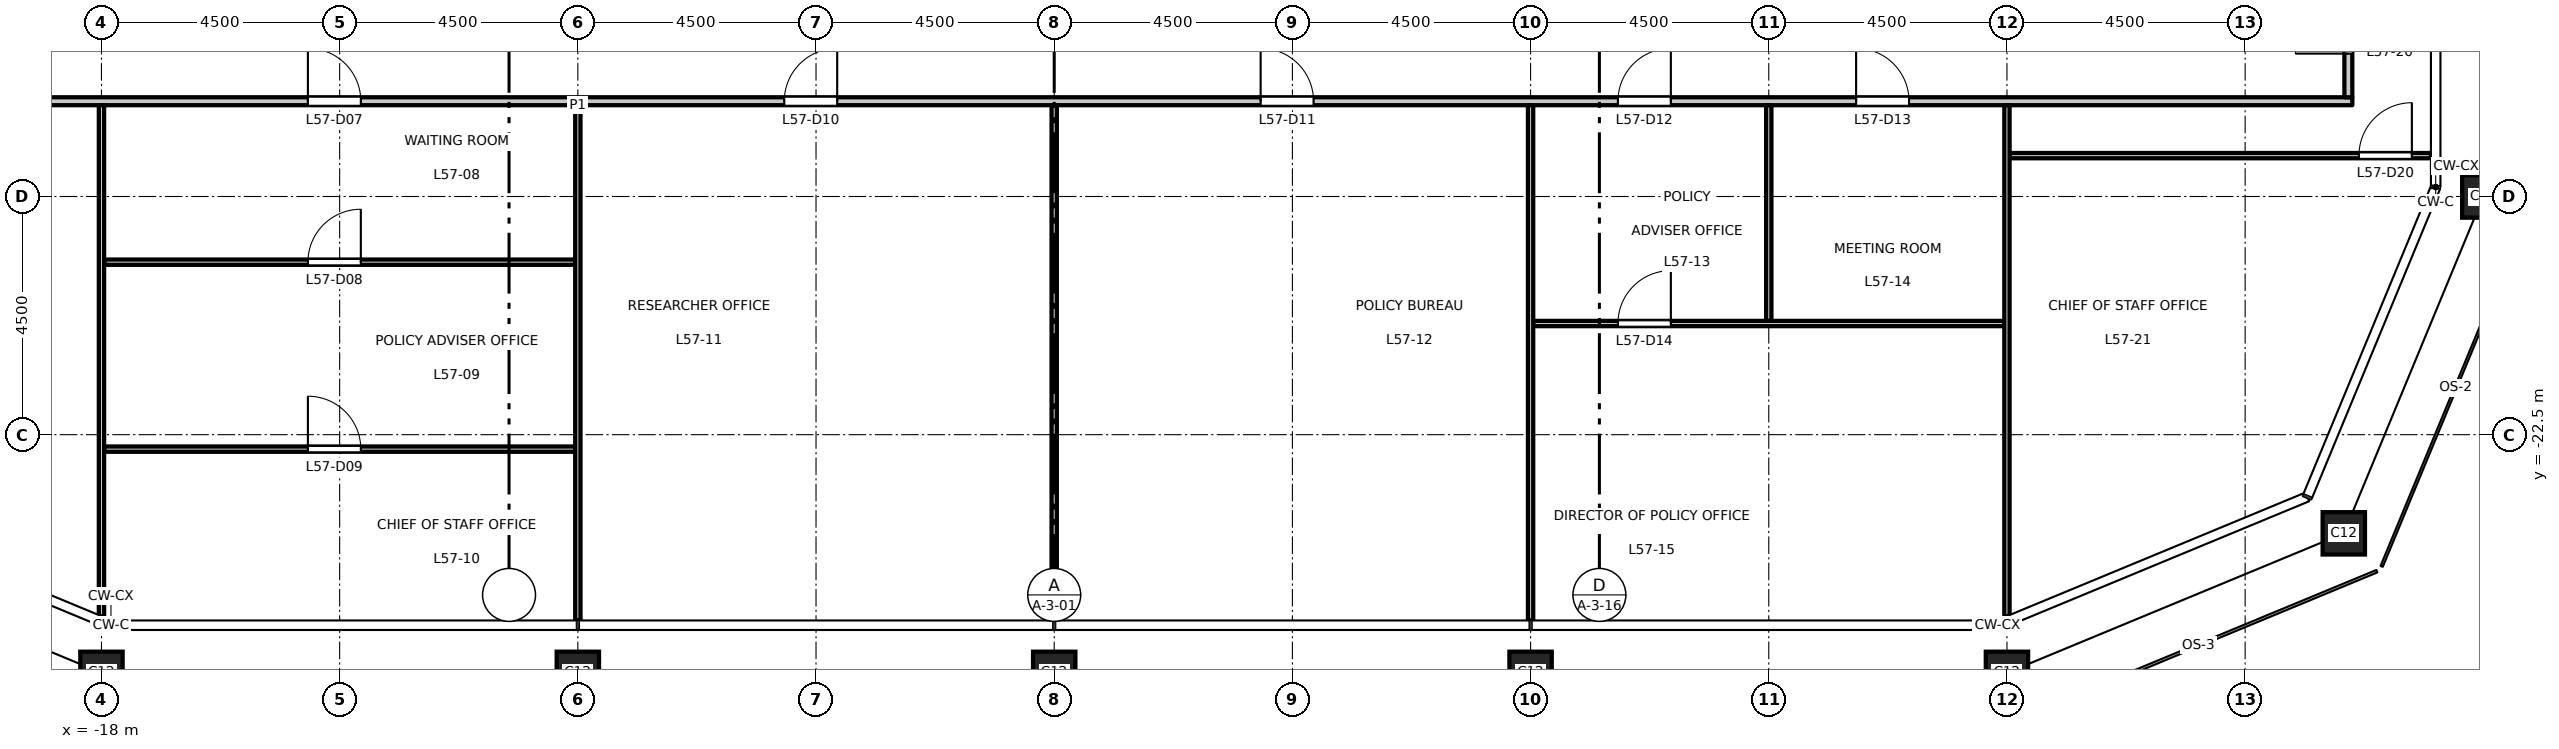
"""IFC4 building model, lengths in metres.
Left out: names, types, materials, properties, quantities, classifications, styles, units other than length and angle.
Written with IfcOpenShell. Run it as: python <this file> out.ifc"""

import sys

from ifc_helpers import new_model, si_unit, direction, frame, frame_2d, origin, origin_2d, place, context, subcontext, project, spatial, rectangle, hollow_rectangle, extrude, element, fill, save


model = new_model("IFC4")
c1 = context("Model", 3, precision=1e-05, world=origin(), true_north=direction((0.0, 1.0)))
c2 = subcontext(c1, "Body", "Model", "MODEL_VIEW")
j1 = project(units=[si_unit("LENGTHUNIT", "METRE"), si_unit("PLANEANGLEUNIT", "RADIAN")], contexts=[c1])
p1 = place(None, origin())
s1 = spatial("IfcSite", under=j1, at=p1, CompositionType="ELEMENT")
p2 = place(p1, origin())
s2 = spatial("IfcBuilding", under=s1, at=p2, CompositionType="ELEMENT")
p3 = place(p2, frame((0.0, 0.0, 264.7)))
s3 = spatial("IfcBuildingStorey", under=s2, at=p3, CompositionType="ELEMENT", Elevation=264.7)
for number, where, z_axis, x_axis in (
    (1, (-18.0, -27.0, 0.0), (0.0, 0.0, 1.0), (1.0, 0.0, 0.0)),
    (2, (-9.0, -27.0, 0.0), (0.0, 0.0, 1.0), (1.0, 0.0, 0.0)),
    (3, (0.0, -27.0, 0.0), (0.0, 0.0, 1.0), (1.0, 0.0, 0.0)),
    (4, (9.0, -27.0, 0.0), (0.0, 0.0, 1.0), (1.0, 0.0, 0.0)),
    (5, (18.0, -27.0, 0.0), (0.0, 0.0, 1.0), (1.0, 0.0, 0.0)),
    (6, (24.364, -24.364, 0.0), (0.0, 0.0, 1.0), (1.0, 0.0, 0.0)),
    (7, (27.0, -18.0, 0.0), (0.0, 0.0, 1.0), (1.0, 0.0, 0.0)),
):
    element("IfcColumn", number, at=place(p3, frame(where, z_axis=z_axis, x_axis=x_axis)), inside=s3, PredefinedType="COLUMN", context=c2, shape_type="SweptSolid", body=[
        extrude(hollow_rectangle(XDim=0.8, YDim=0.8, WallThickness=0.045, at=origin_2d()), origin(), (0.0, 0.0, 1.0), 4.5),
    ])
p4 = place(p3, frame((-17.95, -22.773, 0.0), z_axis=(0.0, 0.0, 1.0), x_axis=(1.0, 0.0, 0.0)))
e8 = element("IfcWall", 8, at=p4, inside=s3, PredefinedType="PARTITIONING", context=c2, shape_type="SweptSolid", body=[
    extrude(rectangle(XDim=8.9, YDim=0.1, at=frame_2d((4.45, 0.0))), origin(), (0.0, 0.0, 1.0), 4.35),
])
p5 = place(p4, frame((3.85, 0.0, 0.0)))
e9 = element("IfcOpeningElement", 9, at=p5, cuts=e8, PredefinedType="OPENING", context=c2, shape_type="SweptSolid", body=[
    extrude(rectangle(XDim=1.0, YDim=2.1, at=frame_2d((0.5, 1.05))), frame((0.0, 0.06, 0.0), z_axis=(0.0, -1.0, 0.0), x_axis=(1.0, 0.0, 0.0)), (0.0, 0.0, 1.0), 0.12),
])
p6 = place(p3, frame((9.05, -20.4, 0.0), z_axis=(0.0, 0.0, 1.0), x_axis=(1.0, 0.0, 0.0)))
e10 = element("IfcWall", 10, at=p6, inside=s3, PredefinedType="PARTITIONING", context=c2, shape_type="SweptSolid", body=[
    extrude(rectangle(XDim=8.9, YDim=0.1, at=frame_2d((4.45, 0.0))), origin(), (0.0, 0.0, 1.0), 4.35),
])
p7 = place(p6, frame((1.6, 0.0, 0.0)))
e11 = element("IfcOpeningElement", 11, at=p7, cuts=e10, PredefinedType="OPENING", context=c2, shape_type="SweptSolid", body=[
    extrude(rectangle(XDim=1.0, YDim=2.1, at=frame_2d((0.5, 1.05))), frame((0.0, 0.06, 0.0), z_axis=(0.0, -1.0, 0.0), x_axis=(1.0, 0.0, 0.0)), (0.0, 0.0, 1.0), 0.12),
])
p8 = place(p3, frame((-17.95, -19.241, 0.0), z_axis=(0.0, 0.0, 1.0), x_axis=(1.0, 0.0, 0.0)))
e12 = element("IfcWall", 12, at=p8, inside=s3, PredefinedType="PARTITIONING", context=c2, shape_type="SweptSolid", body=[
    extrude(rectangle(XDim=8.9, YDim=0.1, at=frame_2d((4.45, 0.0))), origin(), (0.0, 0.0, 1.0), 4.35),
])
p9 = place(p8, frame((3.85, 0.0, 0.0)))
e13 = element("IfcOpeningElement", 13, at=p9, cuts=e12, PredefinedType="OPENING", context=c2, shape_type="SweptSolid", body=[
    extrude(rectangle(XDim=1.0, YDim=2.1, at=frame_2d((0.5, 1.05))), frame((0.0, 0.06, 0.0), z_axis=(0.0, -1.0, 0.0), x_axis=(1.0, 0.0, 0.0)), (0.0, 0.0, 1.0), 0.12),
])
p10 = place(p3, frame((18.05, -17.228, 0.0), z_axis=(0.0, 0.0, 1.0), x_axis=(1.0, 0.0, 0.0)))
e14 = element("IfcWall", 14, at=p10, inside=s3, PredefinedType="PARTITIONING", context=c2, shape_type="SweptSolid", body=[
    extrude(rectangle(XDim=7.96, YDim=0.1, at=frame_2d((3.98, 0.0))), origin(), (0.0, 0.0, 1.0), 4.35),
])
p11 = place(p10, frame((6.6, 0.0, 0.0)))
e15 = element("IfcOpeningElement", 15, at=p11, cuts=e14, PredefinedType="OPENING", context=c2, shape_type="SweptSolid", body=[
    extrude(rectangle(XDim=1.0, YDim=2.1, at=frame_2d((0.5, 1.05))), frame((0.0, 0.06, 0.0), z_axis=(0.0, -1.0, 0.0), x_axis=(1.0, 0.0, 0.0)), (0.0, 0.0, 1.0), 0.12),
])
p12 = place(p3, frame((-24.525, -16.2, 0.0), z_axis=(0.0, 0.0, 1.0), x_axis=(1.0, 0.0, 0.0)))
e16 = element("IfcWall", 16, at=p12, inside=s3, PredefinedType="PARTITIONING", context=c2, shape_type="SweptSolid", body=[
    extrude(rectangle(XDim=49.05, YDim=0.15, at=frame_2d((24.525, 0.0))), origin(), (0.0, 0.0, 1.0), 4.35),
])
p13 = place(p12, frame((10.425, 0.0, 0.0)))
e17 = element("IfcOpeningElement", 17, at=p13, cuts=e16, PredefinedType="OPENING", context=c2, shape_type="SweptSolid", body=[
    extrude(rectangle(XDim=1.0, YDim=2.1, at=frame_2d((0.5, 1.05))), frame((0.0, 0.085, 0.0), z_axis=(0.0, -1.0, 0.0), x_axis=(1.0, 0.0, 0.0)), (0.0, 0.0, 1.0), 0.17),
])
p14 = place(p12, frame((19.425, 0.0, 0.0)))
e18 = element("IfcOpeningElement", 18, at=p14, cuts=e16, PredefinedType="OPENING", context=c2, shape_type="SweptSolid", body=[
    extrude(rectangle(XDim=1.0, YDim=2.1, at=frame_2d((0.5, 1.05))), frame((0.0, 0.085, 0.0), z_axis=(0.0, -1.0, 0.0), x_axis=(1.0, 0.0, 0.0)), (0.0, 0.0, 1.0), 0.17),
])
p15 = place(p12, frame((28.425, 0.0, 0.0)))
e19 = element("IfcOpeningElement", 19, at=p15, cuts=e16, PredefinedType="OPENING", context=c2, shape_type="SweptSolid", body=[
    extrude(rectangle(XDim=1.0, YDim=2.1, at=frame_2d((0.5, 1.05))), frame((0.0, 0.085, 0.0), z_axis=(0.0, -1.0, 0.0), x_axis=(1.0, 0.0, 0.0)), (0.0, 0.0, 1.0), 0.17),
])
p16 = place(p12, frame((35.175, 0.0, 0.0)))
e20 = element("IfcOpeningElement", 20, at=p16, cuts=e16, PredefinedType="OPENING", context=c2, shape_type="SweptSolid", body=[
    extrude(rectangle(XDim=1.0, YDim=2.1, at=frame_2d((0.5, 1.05))), frame((0.0, 0.085, 0.0), z_axis=(0.0, -1.0, 0.0), x_axis=(1.0, 0.0, 0.0)), (0.0, 0.0, 1.0), 0.17),
])
p17 = place(p12, frame((39.675, 0.0, 0.0)))
e21 = element("IfcOpeningElement", 21, at=p17, cuts=e16, PredefinedType="OPENING", context=c2, shape_type="SweptSolid", body=[
    extrude(rectangle(XDim=1.0, YDim=2.1, at=frame_2d((0.5, 1.05))), frame((0.0, 0.085, 0.0), z_axis=(0.0, -1.0, 0.0), x_axis=(1.0, 0.0, 0.0)), (0.0, 0.0, 1.0), 0.17),
])
p18 = place(p12, frame((2.725, 0.0, 0.0)))
e22 = element("IfcOpeningElement", 22, at=p18, cuts=e16, PredefinedType="OPENING", context=c2, shape_type="SweptSolid", body=[
    extrude(rectangle(XDim=1.0, YDim=2.1, at=frame_2d((0.5, 1.05))), frame((0.0, 0.085, 0.0), z_axis=(0.0, -1.0, 0.0), x_axis=(1.0, 0.0, 0.0)), (0.0, 0.0, 1.0), 0.17),
])
p19 = place(p3, frame((-18.0, -25.928, 0.0), z_axis=(0.0, 0.0, 1.0), x_axis=(0.0, 1.0, 0.0)))
e23 = element("IfcWall", 23, at=p19, inside=s3, PredefinedType="PARTITIONING", context=c2, shape_type="SweptSolid", body=[
    extrude(rectangle(XDim=9.653, YDim=0.1, at=frame_2d((4.827, 0.0))), origin(), (0.0, 0.0, 1.0), 3.65),
])
p20 = place(p3, frame((-9.0, -26.01, 0.0), z_axis=(0.0, 0.0, 1.0), x_axis=(0.0, 1.0, 0.0)))
e24 = element("IfcWall", 24, at=p20, inside=s3, PredefinedType="PARTITIONING", context=c2, shape_type="SweptSolid", body=[
    extrude(rectangle(XDim=9.735, YDim=0.1, at=frame_2d((4.868, 0.0))), origin(), (0.0, 0.0, 1.0), 3.65),
])
p21 = place(p3, frame((0.0, -26.01, 0.0), z_axis=(0.0, 0.0, 1.0), x_axis=(0.0, 1.0, 0.0)))
e25 = element("IfcWall", 25, at=p21, inside=s3, PredefinedType="PARTITIONING", context=c2, shape_type="SweptSolid", body=[
    extrude(rectangle(XDim=9.735, YDim=0.1, at=frame_2d((4.868, 0.0))), origin(), (0.0, 0.0, 1.0), 3.55),
])
p22 = place(p3, frame((9.0, -26.01, 0.0), z_axis=(0.0, 0.0, 1.0), x_axis=(0.0, 1.0, 0.0)))
e26 = element("IfcWall", 26, at=p22, inside=s3, PredefinedType="PARTITIONING", context=c2, shape_type="SweptSolid", body=[
    extrude(rectangle(XDim=9.735, YDim=0.1, at=frame_2d((4.868, 0.0))), origin(), (0.0, 0.0, 1.0), 3.65),
])
p23 = place(p3, frame((13.5, -20.35, 0.0), z_axis=(0.0, 0.0, 1.0), x_axis=(0.0, 1.0, 0.0)))
e27 = element("IfcWall", 27, at=p23, inside=s3, PredefinedType="PARTITIONING", context=c2, shape_type="SweptSolid", body=[
    extrude(rectangle(XDim=4.075, YDim=0.1, at=frame_2d((2.038, 0.0))), origin(), (0.0, 0.0, 1.0), 4.35),
])
p24 = place(p3, frame((18.0, -25.928, 0.0), z_axis=(0.0, 0.0, 1.0), x_axis=(0.0, 1.0, 0.0)))
e28 = element("IfcWall", 28, at=p24, inside=s3, PredefinedType="PARTITIONING", context=c2, shape_type="SweptSolid", body=[
    extrude(rectangle(XDim=9.653, YDim=0.1, at=frame_2d((4.827, 0.0))), origin(), (0.0, 0.0, 1.0), 3.65),
])
p25 = place(p3, frame((24.45, -16.125, 0.0), z_axis=(0.0, 0.0, 1.0), x_axis=(0.0, 1.0, 0.0)))
e29 = element("IfcWall", 29, at=p25, inside=s3, PredefinedType="PARTITIONING", context=c2, shape_type="SweptSolid", body=[
    extrude(rectangle(XDim=32.25, YDim=0.15, at=frame_2d((16.125, 0.0))), origin(), (0.0, 0.0, 1.0), 4.35),
])
p26 = place(p25, frame((30.525, 0.0, 0.0)))
e30 = element("IfcOpeningElement", 30, at=p26, cuts=e29, PredefinedType="OPENING", context=c2, shape_type="SweptSolid", body=[
    extrude(rectangle(XDim=1.0, YDim=2.1, at=frame_2d((0.5, 1.05))), frame((0.0, 0.085, 0.0), z_axis=(0.0, -1.0, 0.0), x_axis=(1.0, 0.0, 0.0)), (0.0, 0.0, 1.0), 0.17),
])
p27 = place(p25, frame((0.825, 0.0, 0.0)))
e31 = element("IfcOpeningElement", 31, at=p27, cuts=e29, PredefinedType="OPENING", context=c2, shape_type="SweptSolid", body=[
    extrude(rectangle(XDim=1.0, YDim=2.1, at=frame_2d((0.5, 1.05))), frame((0.0, 0.085, 0.0), z_axis=(0.0, -1.0, 0.0), x_axis=(1.0, 0.0, 0.0)), (0.0, 0.0, 1.0), 0.17),
])
p28 = place(p25, frame((4.275, 0.0, 0.0)))
e32 = element("IfcOpeningElement", 32, at=p28, cuts=e29, PredefinedType="OPENING", context=c2, shape_type="SweptSolid", body=[
    extrude(rectangle(XDim=1.0, YDim=2.1, at=frame_2d((0.5, 1.05))), frame((0.0, 0.085, 0.0), z_axis=(0.0, -1.0, 0.0), x_axis=(1.0, 0.0, 0.0)), (0.0, 0.0, 1.0), 0.17),
])
p29 = place(p25, frame((11.025, 0.0, 0.0)))
e33 = element("IfcOpeningElement", 33, at=p29, cuts=e29, PredefinedType="OPENING", context=c2, shape_type="SweptSolid", body=[
    extrude(rectangle(XDim=1.0, YDim=2.1, at=frame_2d((0.5, 1.05))), frame((0.0, 0.085, 0.0), z_axis=(0.0, -1.0, 0.0), x_axis=(1.0, 0.0, 0.0)), (0.0, 0.0, 1.0), 0.17),
])
p30 = place(p25, frame((20.025, 0.0, 0.0)))
e34 = element("IfcOpeningElement", 34, at=p30, cuts=e29, PredefinedType="OPENING", context=c2, shape_type="SweptSolid", body=[
    extrude(rectangle(XDim=1.0, YDim=2.1, at=frame_2d((0.5, 1.05))), frame((0.0, 0.085, 0.0), z_axis=(0.0, -1.0, 0.0), x_axis=(1.0, 0.0, 0.0)), (0.0, 0.0, 1.0), 0.17),
])
p31 = place(p25, frame((26.775, 0.0, 0.0)))
e35 = element("IfcOpeningElement", 35, at=p31, cuts=e29, PredefinedType="OPENING", context=c2, shape_type="SweptSolid", body=[
    extrude(rectangle(XDim=1.0, YDim=2.1, at=frame_2d((0.5, 1.05))), frame((0.0, 0.085, 0.0), z_axis=(0.0, -1.0, 0.0), x_axis=(1.0, 0.0, 0.0)), (0.0, 0.0, 1.0), 0.17),
])
p32 = place(p13, origin())
e36 = element("IfcDoor", 36, at=p32, inside=s3, OperationType="SINGLE_SWING_LEFT", PredefinedType="DOOR", context=c2, shape_type="SweptSolid", body=[
    extrude(rectangle(XDim=1.0, YDim=2.1, at=frame_2d((0.5, 1.05))), frame((0.0, 0.025, 0.0), z_axis=(0.0, -1.0, 0.0), x_axis=(1.0, 0.0, 0.0)), (0.0, 0.0, 1.0), 0.05),
])
fill(e17, e36)
p33 = place(p9, origin())
e37 = element("IfcDoor", 37, at=p33, inside=s3, OperationType="SINGLE_SWING_RIGHT", PredefinedType="DOOR", context=c2, shape_type="SweptSolid", body=[
    extrude(rectangle(XDim=1.0, YDim=2.1, at=frame_2d((0.5, 1.05))), frame((0.0, 0.025, 0.0), z_axis=(0.0, -1.0, 0.0), x_axis=(1.0, 0.0, 0.0)), (0.0, 0.0, 1.0), 0.05),
])
fill(e13, e37)
p34 = place(p5, origin())
e38 = element("IfcDoor", 38, at=p34, inside=s3, OperationType="SINGLE_SWING_LEFT", PredefinedType="DOOR", context=c2, shape_type="SweptSolid", body=[
    extrude(rectangle(XDim=1.0, YDim=2.1, at=frame_2d((0.5, 1.05))), frame((0.0, 0.025, 0.0), z_axis=(0.0, -1.0, 0.0), x_axis=(1.0, 0.0, 0.0)), (0.0, 0.0, 1.0), 0.05),
])
fill(e9, e38)
p35 = place(p14, origin())
e39 = element("IfcDoor", 39, at=p35, inside=s3, OperationType="SINGLE_SWING_RIGHT", PredefinedType="DOOR", context=c2, shape_type="SweptSolid", body=[
    extrude(rectangle(XDim=1.0, YDim=2.1, at=frame_2d((0.5, 1.05))), frame((0.0, 0.025, 0.0), z_axis=(0.0, -1.0, 0.0), x_axis=(1.0, 0.0, 0.0)), (0.0, 0.0, 1.0), 0.05),
])
fill(e18, e39)
p36 = place(p15, origin())
e40 = element("IfcDoor", 40, at=p36, inside=s3, OperationType="SINGLE_SWING_LEFT", PredefinedType="DOOR", context=c2, shape_type="SweptSolid", body=[
    extrude(rectangle(XDim=1.0, YDim=2.1, at=frame_2d((0.5, 1.05))), frame((0.0, 0.025, 0.0), z_axis=(0.0, -1.0, 0.0), x_axis=(1.0, 0.0, 0.0)), (0.0, 0.0, 1.0), 0.05),
])
fill(e19, e40)
p37 = place(p16, origin())
e41 = element("IfcDoor", 41, at=p37, inside=s3, OperationType="SINGLE_SWING_RIGHT", PredefinedType="DOOR", context=c2, shape_type="SweptSolid", body=[
    extrude(rectangle(XDim=1.0, YDim=2.1, at=frame_2d((0.5, 1.05))), frame((0.0, 0.025, 0.0), z_axis=(0.0, -1.0, 0.0), x_axis=(1.0, 0.0, 0.0)), (0.0, 0.0, 1.0), 0.05),
])
fill(e20, e41)
p38 = place(p17, origin())
e42 = element("IfcDoor", 42, at=p38, inside=s3, OperationType="SINGLE_SWING_LEFT", PredefinedType="DOOR", context=c2, shape_type="SweptSolid", body=[
    extrude(rectangle(XDim=1.0, YDim=2.1, at=frame_2d((0.5, 1.05))), frame((0.0, 0.025, 0.0), z_axis=(0.0, -1.0, 0.0), x_axis=(1.0, 0.0, 0.0)), (0.0, 0.0, 1.0), 0.05),
])
fill(e21, e42)
p39 = place(p7, origin())
e43 = element("IfcDoor", 43, at=p39, inside=s3, OperationType="SINGLE_SWING_RIGHT", PredefinedType="DOOR", context=c2, shape_type="SweptSolid", body=[
    extrude(rectangle(XDim=1.0, YDim=2.1, at=frame_2d((0.5, 1.05))), frame((0.0, 0.025, 0.0), z_axis=(0.0, -1.0, 0.0), x_axis=(1.0, 0.0, 0.0)), (0.0, 0.0, 1.0), 0.05),
])
fill(e11, e43)
p40 = place(p27, origin())
e44 = element("IfcDoor", 44, at=p40, inside=s3, OperationType="SINGLE_SWING_LEFT", PredefinedType="DOOR", context=c2, shape_type="SweptSolid", body=[
    extrude(rectangle(XDim=1.0, YDim=2.1, at=frame_2d((0.5, 1.05))), frame((0.0, 0.025, 0.0), z_axis=(0.0, -1.0, 0.0), x_axis=(1.0, 0.0, 0.0)), (0.0, 0.0, 1.0), 0.05),
])
fill(e31, e44)
p41 = place(p11, origin())
e45 = element("IfcDoor", 45, at=p41, inside=s3, OperationType="SINGLE_SWING_RIGHT", PredefinedType="DOOR", context=c2, shape_type="SweptSolid", body=[
    extrude(rectangle(XDim=1.0, YDim=2.1, at=frame_2d((0.5, 1.05))), frame((0.0, 0.025, 0.0), z_axis=(0.0, -1.0, 0.0), x_axis=(1.0, 0.0, 0.0)), (0.0, 0.0, 1.0), 0.05),
])
fill(e15, e45)
save(model, sys.argv[1])
